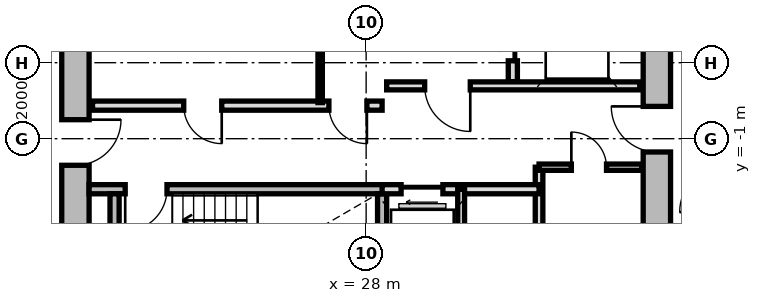
"""IFC4 building model, lengths in metres.
Left out: names, types, materials, properties, quantities, classifications, styles, units other than length and angle.
Written with IfcOpenShell. Run it as: python <this file> out.ifc"""

import sys

from ifc_helpers import new_model, si_unit, direction, frame, frame_2d, origin, place, context, subcontext, project, spatial, rectangle, extrude, source, transform, mapped, element, fill, save


model = new_model("IFC4")
c1 = context("Model", 3, precision=1e-05, world=origin(), true_north=direction((0.0, 1.0)))
c2 = subcontext(c1, "Body", "Model", "MODEL_VIEW")
j1 = project(units=[si_unit("LENGTHUNIT", "METRE"), si_unit("PLANEANGLEUNIT", "RADIAN")], contexts=[c1])
p1 = place(None, origin())
s1 = spatial("IfcSite", under=j1, at=p1, CompositionType="ELEMENT")
p2 = place(p1, origin())
s2 = spatial("IfcBuilding", under=s1, at=p2, CompositionType="ELEMENT")
p3 = place(p2, frame((0.0, 0.0, 93.2)))
s3 = spatial("IfcBuildingStorey", under=s2, at=p3, CompositionType="ELEMENT", Elevation=93.2)
m1 = source(origin(), c2, "Body", "SweptSolid", [
    extrude(rectangle(XDim=11.0, YDim=0.72, at=frame_2d((5.5, 0.0))), origin(), (0.0, 0.0, 1.0), 2.79),
])
p4 = place(p3, frame((20.35, -5.5, 0.0), z_axis=(0.0, 0.0, 1.0), x_axis=(0.0, 1.0, 0.0)))
e1 = element("IfcWall", 1, at=p4, inside=s3, PredefinedType="SHEAR", context=c2, shape_type="MappedRepresentation", body=[
    mapped(m1, transform((0.0, 0.0, 0.0), x_axis=(1.0, 0.0, 0.0), y_axis=(0.0, 1.0, 0.0), z_axis=(0.0, 0.0, 1.0), scale=1.0)),
])
p5 = place(p4, frame((3.8, 0.0, 0.0)))
e2 = element("IfcOpeningElement", 2, at=p5, cuts=e1, PredefinedType="OPENING", context=c2, shape_type="SweptSolid", body=[
    extrude(rectangle(XDim=1.2, YDim=2.15, at=frame_2d((0.6, 1.075))), frame((0.0, 0.37, 0.0), z_axis=(0.0, -1.0, 0.0), x_axis=(1.0, 0.0, 0.0)), (0.0, 0.0, 1.0), 0.74),
])
p6 = place(p3, frame((35.65, 5.5, 0.0), z_axis=(0.0, 0.0, 1.0), x_axis=(0.0, -1.0, 0.0)))
e3 = element("IfcWall", 3, at=p6, inside=s3, PredefinedType="SHEAR", context=c2, shape_type="MappedRepresentation", body=[
    mapped(m1, transform((0.0, 0.0, 0.0), x_axis=(1.0, 0.0, 0.0), y_axis=(0.0, 1.0, 0.0), z_axis=(0.0, 0.0, 1.0), scale=1.0)),
])
p7 = place(p6, frame((5.65, 0.0, 0.0)))
e4 = element("IfcOpeningElement", 4, at=p7, cuts=e3, PredefinedType="OPENING", context=c2, shape_type="SweptSolid", body=[
    extrude(rectangle(XDim=1.2, YDim=2.15, at=frame_2d((0.6, 1.075))), frame((0.0, 0.37, 0.0), z_axis=(0.0, -1.0, 0.0), x_axis=(1.0, 0.0, 0.0)), (0.0, 0.0, 1.0), 0.74),
])
p8 = place(p6, frame((9.3, 0.0, 0.0)))
e5 = element("IfcOpeningElement", 5, at=p8, cuts=e3, PredefinedType="OPENING", context=c2, shape_type="SweptSolid", body=[
    extrude(rectangle(XDim=1.0, YDim=2.1, at=frame_2d((0.5, 1.05))), frame((0.0, 0.37, 0.0), z_axis=(0.0, -1.0, 0.0), x_axis=(1.0, 0.0, 0.0)), (0.0, 0.0, 1.0), 0.74),
])
m2 = source(origin(), c2, "Body", "SweptSolid", [
    extrude(rectangle(XDim=7.83, YDim=0.24, at=frame_2d((3.915, 0.0))), origin(), (0.0, 0.0, 1.0), 2.79),
])
p9 = place(p3, frame((20.71, -2.33, 0.0), z_axis=(0.0, 0.0, 1.0), x_axis=(1.0, 0.0, 0.0)))
e6 = element("IfcWall", 6, at=p9, inside=s3, PredefinedType="PARTITIONING", context=c2, shape_type="MappedRepresentation", body=[
    mapped(m2, transform((0.0, 0.0, 0.0), x_axis=(1.0, 0.0, 0.0), y_axis=(0.0, 1.0, 0.0), z_axis=(0.0, 0.0, 1.0), scale=1.0)),
])
p10 = place(p9, frame((0.95, 0.0, 0.0)))
e7 = element("IfcOpeningElement", 7, at=p10, cuts=e6, PredefinedType="OPENING", context=c2, shape_type="SweptSolid", body=[
    extrude(rectangle(XDim=1.1, YDim=2.15, at=frame_2d((0.55, 1.075))), frame((0.0, 0.13, 0.0), z_axis=(0.0, -1.0, 0.0), x_axis=(1.0, 0.0, 0.0)), (0.0, 0.0, 1.0), 0.26),
])
m3 = source(origin(), c2, "Body", "SweptSolid", [
    extrude(rectangle(XDim=3.14, YDim=0.24, at=frame_2d((1.57, 0.0))), origin(), (0.0, 0.0, 1.0), 2.79),
])
for number, where, z_axis, x_axis in (
    (8, (21.38, -5.59, 0.0), (0.0, 0.0, 1.0), (0.0, 1.0, 0.0)),
    (9, (28.42, -5.59, 0.0), (0.0, 0.0, 1.0), (0.0, 1.0, 0.0)),
):
    element("IfcWall", number, at=place(p3, frame(where, z_axis=z_axis, x_axis=x_axis)), inside=s3, PredefinedType="PARTITIONING", context=c2, shape_type="MappedRepresentation", body=[
        mapped(m3, transform((0.0, 0.0, 0.0), x_axis=(1.0, 0.0, 0.0), y_axis=(0.0, 1.0, 0.0), z_axis=(0.0, 0.0, 1.0), scale=1.0)),
    ])
m4 = source(origin(), c2, "Body", "SweptSolid", [
    extrude(rectangle(XDim=5.0, YDim=0.24, at=frame_2d((2.5, 0.0))), origin(), (0.0, 0.0, 1.0), 2.775),
])
p11 = place(p3, frame((31.86, 0.5, 0.0), z_axis=(0.0, 0.0, 1.0), x_axis=(0.0, 1.0, 0.0)))
e10 = element("IfcWall", 10, at=p11, inside=s3, PredefinedType="PARTITIONING", context=c2, shape_type="MappedRepresentation", body=[
    mapped(m4, transform((0.0, 0.0, 0.0), x_axis=(1.0, 0.0, 0.0), y_axis=(0.0, 1.0, 0.0), z_axis=(0.0, 0.0, 1.0), scale=1.0)),
])
p12 = place(p11, frame((3.05, 0.0, 0.0)))
e11 = element("IfcOpeningElement", 11, at=p12, cuts=e10, PredefinedType="OPENING", context=c2, shape_type="SweptSolid", body=[
    extrude(rectangle(XDim=1.3, YDim=2.2, at=frame_2d((0.65, 1.1))), frame((0.0, 0.13, 0.0), z_axis=(0.0, -1.0, 0.0), x_axis=(1.0, 0.0, 0.0)), (0.0, 0.0, 1.0), 0.26),
])
p13 = place(p11, frame((0.55, 0.0, 0.0)))
e12 = element("IfcOpeningElement", 12, at=p13, cuts=e10, PredefinedType="OPENING", context=c2, shape_type="SweptSolid", body=[
    extrude(rectangle(XDim=1.3, YDim=2.2, at=frame_2d((0.65, 1.1))), frame((0.0, 0.13, 0.0), z_axis=(0.0, -1.0, 0.0), x_axis=(1.0, 0.0, 0.0)), (0.0, 0.0, 1.0), 0.26),
])
m5 = source(origin(), c2, "Body", "SweptSolid", [
    extrude(rectangle(XDim=6.66, YDim=0.21, at=frame_2d((3.33, 0.0))), origin(), (0.0, 0.0, 1.0), 2.775),
])
p14 = place(p3, frame((28.54, 0.39, 0.0), z_axis=(0.0, 0.0, 1.0), x_axis=(1.0, 0.0, 0.0)))
e13 = element("IfcWall", 13, at=p14, inside=s3, PredefinedType="PARTITIONING", context=c2, shape_type="MappedRepresentation", body=[
    mapped(m5, transform((0.0, 0.0, 0.0), x_axis=(1.0, 0.0, 0.0), y_axis=(0.0, 1.0, 0.0), z_axis=(0.0, 0.0, 1.0), scale=1.0)),
])
p15 = place(p14, frame((1.0, 0.0, 0.0)))
e14 = element("IfcOpeningElement", 14, at=p15, cuts=e13, PredefinedType="OPENING", context=c2, shape_type="SweptSolid", body=[
    extrude(rectangle(XDim=1.2, YDim=2.15, at=frame_2d((0.6, 1.075))), frame((0.0, 0.115, 0.0), z_axis=(0.0, -1.0, 0.0), x_axis=(1.0, 0.0, 0.0)), (0.0, 0.0, 1.0), 0.23),
])
m6 = source(origin(), c2, "Body", "SweptSolid", [
    extrude(rectangle(XDim=7.62, YDim=0.24, at=frame_2d((3.81, 0.0))), origin(), (0.0, 0.0, 1.0), 2.775),
])
p16 = place(p3, frame((20.8, -0.13, 0.0), z_axis=(0.0, 0.0, 1.0), x_axis=(1.0, 0.0, 0.0)))
e15 = element("IfcWall", 15, at=p16, inside=s3, PredefinedType="PARTITIONING", context=c2, shape_type="MappedRepresentation", body=[
    mapped(m6, transform((0.0, 0.0, 0.0), x_axis=(1.0, 0.0, 0.0), y_axis=(0.0, 1.0, 0.0), z_axis=(0.0, 0.0, 1.0), scale=1.0)),
])
p17 = place(p16, frame((6.22, 0.0, 0.0)))
e16 = element("IfcOpeningElement", 16, at=p17, cuts=e15, PredefinedType="OPENING", context=c2, shape_type="SweptSolid", body=[
    extrude(rectangle(XDim=1.0, YDim=2.1, at=frame_2d((0.5, 1.05))), frame((0.0, 0.13, 0.0), z_axis=(0.0, -1.0, 0.0), x_axis=(1.0, 0.0, 0.0)), (0.0, 0.0, 1.0), 0.26),
])
p18 = place(p16, frame((2.4, 0.0, 0.0)))
e17 = element("IfcOpeningElement", 17, at=p18, cuts=e15, PredefinedType="OPENING", context=c2, shape_type="SweptSolid", body=[
    extrude(rectangle(XDim=1.0, YDim=2.1, at=frame_2d((0.5, 1.05))), frame((0.0, 0.13, 0.0), z_axis=(0.0, -1.0, 0.0), x_axis=(1.0, 0.0, 0.0)), (0.0, 0.0, 1.0), 0.26),
])
m7 = source(origin(), c2, "Body", "SweptSolid", [
    extrude(rectangle(XDim=2.33, YDim=0.115, at=frame_2d((1.165, 0.0))), origin(), (0.0, 0.0, 1.0), 2.775),
])
p19 = place(p3, frame((26.79, -0.05, 0.0), z_axis=(0.0, 0.0, 1.0), x_axis=(0.0, 1.0, 0.0)))
e18 = element("IfcWall", 18, at=p19, inside=s3, PredefinedType="PARTITIONING", context=c2, shape_type="MappedRepresentation", body=[
    mapped(m7, transform((0.0, 0.0, 0.0), x_axis=(1.0, 0.0, 0.0), y_axis=(0.0, 1.0, 0.0), z_axis=(0.0, 0.0, 1.0), scale=1.0)),
])
m8 = source(origin(), c2, "Body", "SweptSolid", [
    extrude(rectangle(XDim=3.8, YDim=0.2, at=frame_2d((1.9, 0.0))), origin(), (0.0, 0.0, 1.0), 2.775),
])
p20 = place(p3, frame((32.55, -5.55, 0.0), z_axis=(0.0, 0.0, 1.0), x_axis=(0.0, 1.0, 0.0)))
e19 = element("IfcWall", 19, at=p20, inside=s3, PredefinedType="PARTITIONING", context=c2, shape_type="MappedRepresentation", body=[
    mapped(m8, transform((0.0, 0.0, 0.0), x_axis=(1.0, 0.0, 0.0), y_axis=(0.0, 1.0, 0.0), z_axis=(0.0, 0.0, 1.0), scale=1.0)),
])
m9 = source(origin(), c2, "Body", "SweptSolid", [
    extrude(rectangle(XDim=4.13, YDim=0.24, at=frame_2d((2.065, 0.0))), origin(), (0.0, 0.0, 1.0), 2.775),
])
p21 = place(p3, frame((28.42, -2.33, 0.0), z_axis=(0.0, 0.0, 1.0), x_axis=(1.0, 0.0, 0.0)))
e20 = element("IfcWall", 20, at=p21, inside=s3, PredefinedType="PARTITIONING", context=c2, shape_type="MappedRepresentation", body=[
    mapped(m9, transform((0.0, 0.0, 0.0), x_axis=(1.0, 0.0, 0.0), y_axis=(0.0, 1.0, 0.0), z_axis=(0.0, 0.0, 1.0), scale=1.0)),
])
p22 = place(p21, frame((0.5, 0.0, 0.0)))
e21 = element("IfcOpeningElement", 21, at=p22, cuts=e20, PredefinedType="OPENING", context=c2, shape_type="SweptSolid", body=[
    extrude(rectangle(XDim=1.1, YDim=2.2, at=frame_2d((0.55, 1.1))), frame((0.0, 0.13, 0.0), z_axis=(0.0, -1.0, 0.0), x_axis=(1.0, 0.0, 0.0)), (0.0, 0.0, 1.0), 0.26),
])
m10 = source(origin(), c2, "Body", "SweptSolid", [
    extrude(rectangle(XDim=3.22, YDim=0.18, at=frame_2d((1.61, 0.0))), origin(), (0.0, 0.0, 1.0), 2.775),
])
p23 = place(p3, frame((30.5, -5.55, 0.0), z_axis=(0.0, 0.0, 1.0), x_axis=(0.0, 1.0, 0.0)))
e22 = element("IfcWall", 22, at=p23, inside=s3, PredefinedType="PARTITIONING", context=c2, shape_type="MappedRepresentation", body=[
    mapped(m10, transform((0.0, 0.0, 0.0), x_axis=(1.0, 0.0, 0.0), y_axis=(0.0, 1.0, 0.0), z_axis=(0.0, 0.0, 1.0), scale=1.0)),
])
m11 = source(origin(), c2, "Body", "SweptSolid", [
    extrude(rectangle(XDim=2.7, YDim=0.165, at=frame_2d((1.35, 0.0))), origin(), (0.0, 0.0, 1.0), 2.775),
])
p24 = place(p3, frame((32.55, -1.75, 0.0), z_axis=(0.0, 0.0, 1.0), x_axis=(1.0, 0.0, 0.0)))
e23 = element("IfcWall", 23, at=p24, inside=s3, PredefinedType="PARTITIONING", context=c2, shape_type="MappedRepresentation", body=[
    mapped(m11, transform((0.0, 0.0, 0.0), x_axis=(1.0, 0.0, 0.0), y_axis=(0.0, 1.0, 0.0), z_axis=(0.0, 0.0, 1.0), scale=1.0)),
])
p25 = place(p24, frame((0.85, 0.0, 0.0)))
e24 = element("IfcOpeningElement", 24, at=p25, cuts=e23, PredefinedType="OPENING", context=c2, shape_type="SweptSolid", body=[
    extrude(rectangle(XDim=0.925, YDim=2.1, at=frame_2d((0.462, 1.05))), frame((0.0, 0.093, 0.0), z_axis=(0.0, -1.0, 0.0), x_axis=(1.0, 0.0, 0.0)), (0.0, 0.0, 1.0), 0.185),
])
m12 = source(origin(), c2, "Body", "SweptSolid", [
    extrude(rectangle(XDim=1.1, YDim=2.15, at=frame_2d((0.55, 1.075))), frame((0.0, 0.025, 0.0), z_axis=(0.0, -1.0, 0.0), x_axis=(1.0, 0.0, 0.0)), (0.0, 0.0, 1.0), 0.05),
])
p26 = place(p10, frame((1.1, 0.0, 0.0), z_axis=(0.0, 0.0, 1.0), x_axis=(-1.0, 0.0, 0.0)))
e25 = element("IfcDoor", 25, at=p26, inside=s3, OperationType="SINGLE_SWING_RIGHT", PredefinedType="DOOR", context=c2, shape_type="MappedRepresentation", body=[
    mapped(m12, transform((0.0, 0.0, 0.0), x_axis=(1.0, 0.0, 0.0), y_axis=(0.0, 1.0, 0.0), z_axis=(0.0, 0.0, 1.0), scale=1.0)),
])
fill(e7, e25)
m13 = source(origin(), c2, "Body", "SweptSolid", [
    extrude(rectangle(XDim=1.3, YDim=2.2, at=frame_2d((0.65, 1.1))), frame((0.0, 0.025, 0.0), z_axis=(0.0, -1.0, 0.0), x_axis=(1.0, 0.0, 0.0)), (0.0, 0.0, 1.0), 0.05),
])
p27 = place(p13, origin())
e26 = element("IfcDoor", 26, at=p27, inside=s3, OperationType="SLIDING_TO_RIGHT", PredefinedType="DOOR", context=c2, shape_type="MappedRepresentation", body=[
    mapped(m13, transform((0.0, 0.0, 0.0), x_axis=(1.0, 0.0, 0.0), y_axis=(0.0, 1.0, 0.0), z_axis=(0.0, 0.0, 1.0), scale=1.0)),
])
fill(e12, e26)
m14 = source(origin(), c2, "Body", "SweptSolid", [
    extrude(rectangle(XDim=1.2, YDim=2.15, at=frame_2d((0.6, 1.075))), frame((0.0, 0.025, 0.0), z_axis=(0.0, -1.0, 0.0), x_axis=(1.0, 0.0, 0.0)), (0.0, 0.0, 1.0), 0.05),
])
p28 = place(p15, frame((1.2, 0.0, 0.0), z_axis=(0.0, 0.0, 1.0), x_axis=(-1.0, 0.0, 0.0)))
e27 = element("IfcDoor", 27, at=p28, inside=s3, OperationType="SINGLE_SWING_LEFT", PredefinedType="DOOR", context=c2, shape_type="MappedRepresentation", body=[
    mapped(m14, transform((0.0, 0.0, 0.0), x_axis=(1.0, 0.0, 0.0), y_axis=(0.0, 1.0, 0.0), z_axis=(0.0, 0.0, 1.0), scale=1.0)),
])
fill(e14, e27)
p29 = place(p5, frame((1.2, 0.0, 0.0), z_axis=(0.0, 0.0, 1.0), x_axis=(-1.0, 0.0, 0.0)))
e28 = element("IfcDoor", 28, at=p29, inside=s3, OperationType="SINGLE_SWING_LEFT", PredefinedType="DOOR", context=c2, shape_type="MappedRepresentation", body=[
    mapped(m14, transform((0.0, 0.0, 0.0), x_axis=(1.0, 0.0, 0.0), y_axis=(0.0, 1.0, 0.0), z_axis=(0.0, 0.0, 1.0), scale=1.0)),
])
fill(e2, e28)
p30 = place(p7, frame((1.2, 0.0, 0.0), z_axis=(0.0, 0.0, 1.0), x_axis=(-1.0, 0.0, 0.0)))
e29 = element("IfcDoor", 29, at=p30, inside=s3, OperationType="SINGLE_SWING_RIGHT", PredefinedType="DOOR", context=c2, shape_type="MappedRepresentation", body=[
    mapped(m14, transform((0.0, 0.0, 0.0), x_axis=(1.0, 0.0, 0.0), y_axis=(0.0, 1.0, 0.0), z_axis=(0.0, 0.0, 1.0), scale=1.0)),
])
fill(e4, e29)
m15 = source(origin(), c2, "Body", "SweptSolid", [
    extrude(rectangle(XDim=1.0, YDim=2.1, at=frame_2d((0.5, 1.05))), frame((0.0, 0.025, 0.0), z_axis=(0.0, -1.0, 0.0), x_axis=(1.0, 0.0, 0.0)), (0.0, 0.0, 1.0), 0.05),
])
p31 = place(p17, frame((1.0, 0.0, 0.0), z_axis=(0.0, 0.0, 1.0), x_axis=(-1.0, 0.0, 0.0)))
e30 = element("IfcDoor", 30, at=p31, inside=s3, OperationType="SINGLE_SWING_LEFT", PredefinedType="DOOR", context=c2, shape_type="MappedRepresentation", body=[
    mapped(m15, transform((0.0, 0.0, 0.0), x_axis=(1.0, 0.0, 0.0), y_axis=(0.0, 1.0, 0.0), z_axis=(0.0, 0.0, 1.0), scale=1.0)),
])
fill(e16, e30)
p32 = place(p18, frame((1.0, 0.0, 0.0), z_axis=(0.0, 0.0, 1.0), x_axis=(-1.0, 0.0, 0.0)))
e31 = element("IfcDoor", 31, at=p32, inside=s3, OperationType="SINGLE_SWING_LEFT", PredefinedType="DOOR", context=c2, shape_type="MappedRepresentation", body=[
    mapped(m15, transform((0.0, 0.0, 0.0), x_axis=(1.0, 0.0, 0.0), y_axis=(0.0, 1.0, 0.0), z_axis=(0.0, 0.0, 1.0), scale=1.0)),
])
fill(e17, e31)
m16 = source(origin(), c2, "Body", "SweptSolid", [
    extrude(rectangle(XDim=1.1, YDim=2.2, at=frame_2d((0.55, 1.1))), frame((0.0, 0.025, 0.0), z_axis=(0.0, -1.0, 0.0), x_axis=(1.0, 0.0, 0.0)), (0.0, 0.0, 1.0), 0.05),
])
p33 = place(p22, frame((1.1, 0.0, 0.0), z_axis=(0.0, 0.0, 1.0), x_axis=(-1.0, 0.0, 0.0)))
e32 = element("IfcDoor", 32, at=p33, inside=s3, OperationType="SLIDING_TO_LEFT", PredefinedType="DOOR", context=c2, shape_type="MappedRepresentation", body=[
    mapped(m16, transform((0.0, 0.0, 0.0), x_axis=(1.0, 0.0, 0.0), y_axis=(0.0, 1.0, 0.0), z_axis=(0.0, 0.0, 1.0), scale=1.0)),
])
fill(e21, e32)
m17 = source(origin(), c2, "Body", "SweptSolid", [
    extrude(rectangle(XDim=0.925, YDim=2.1, at=frame_2d((0.462, 1.05))), frame((0.0, 0.025, 0.0), z_axis=(0.0, -1.0, 0.0), x_axis=(1.0, 0.0, 0.0)), (0.0, 0.0, 1.0), 0.05),
])
p34 = place(p25, origin())
e33 = element("IfcDoor", 33, at=p34, inside=s3, OperationType="SINGLE_SWING_LEFT", PredefinedType="DOOR", context=c2, shape_type="MappedRepresentation", body=[
    mapped(m17, transform((0.0, 0.0, 0.0), x_axis=(1.0, 0.0, 0.0), y_axis=(0.0, 1.0, 0.0), z_axis=(0.0, 0.0, 1.0), scale=1.0)),
])
fill(e24, e33)
save(model, sys.argv[1])
